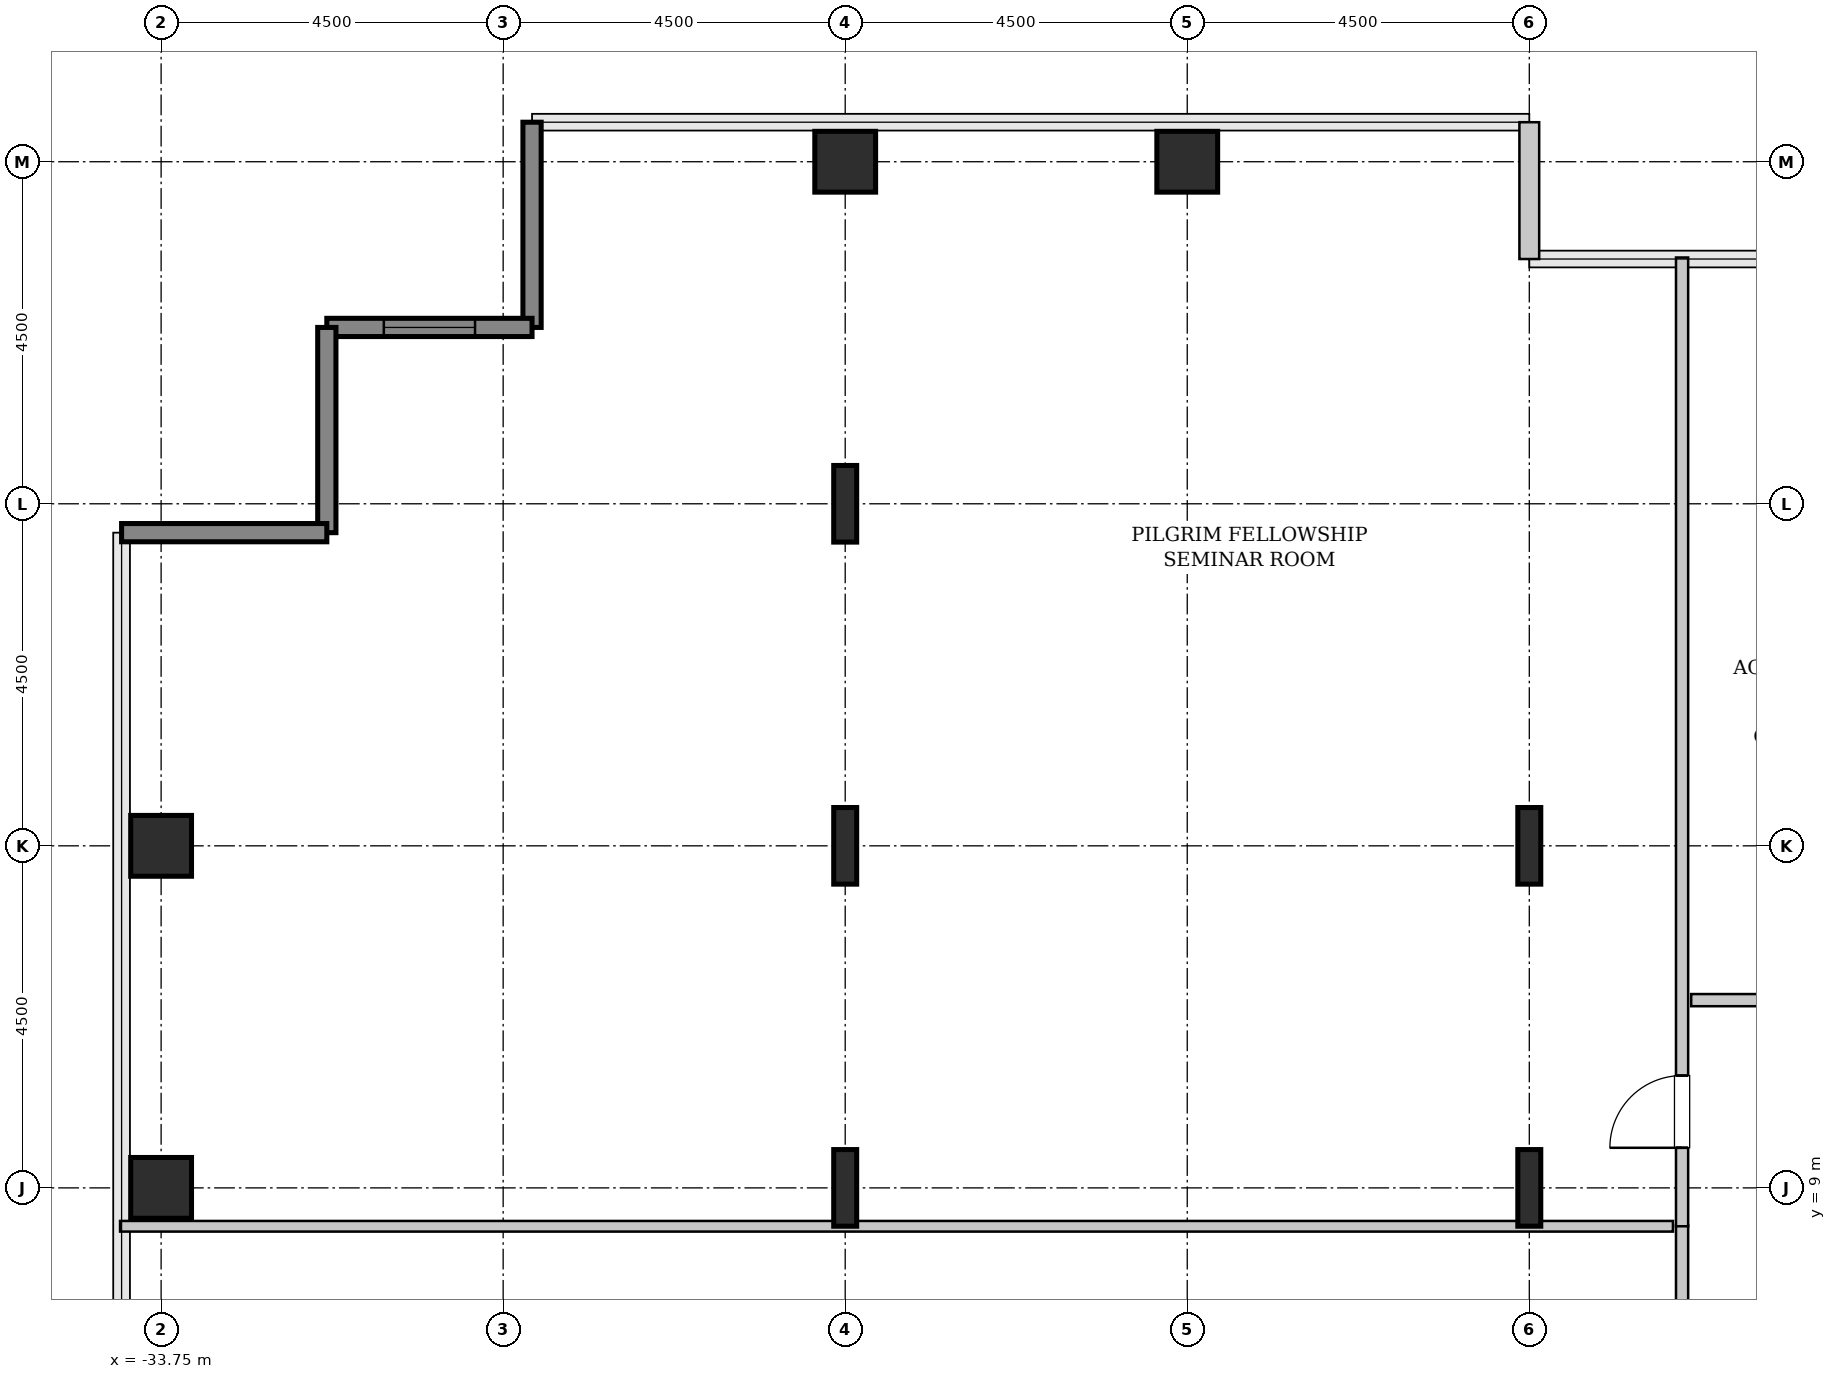
"""IFC4 building model, lengths in metres.
Left out: names, types, materials, properties, quantities, classifications, styles, units other than length and angle.
Written with IfcOpenShell. Run it as: python <this file> out.ifc"""

import sys

from ifc_helpers import new_model, si_unit, direction, frame, frame_2d, origin, origin_2d, place, context, subcontext, project, spatial, rectangle, hollow_rectangle, i_section, extrude, source, transform, mapped, element, fill, save


model = new_model("IFC4")
c1 = context("Model", 3, precision=1e-05, world=origin(), true_north=direction((0.0, 1.0)))
c2 = subcontext(c1, "Body", "Model", "MODEL_VIEW")
j1 = project(units=[si_unit("LENGTHUNIT", "METRE"), si_unit("PLANEANGLEUNIT", "RADIAN")], contexts=[c1])
p1 = place(None, origin())
s1 = spatial("IfcSite", under=j1, at=p1, CompositionType="ELEMENT")
p2 = place(p1, origin())
s2 = spatial("IfcBuilding", under=s1, at=p2, CompositionType="ELEMENT")
p3 = place(p2, frame((0.0, 0.0, 117.4)))
s3 = spatial("IfcBuildingStorey", under=s2, at=p3, CompositionType="ELEMENT", Elevation=117.4)
m1 = source(origin(), c2, "Body", "SweptSolid", [
    extrude(hollow_rectangle(XDim=0.8, YDim=0.8, WallThickness=0.04, InnerFilletRadius=0.04, OuterFilletRadius=0.08, at=origin_2d()), origin(), (0.0, 0.0, 1.0), 3.8),
])
for number, where, z_axis, x_axis in (
    (1, (-33.75, 9.0, 0.0), (0.0, 0.0, 1.0), (1.0, 0.0, 0.0)),
    (2, (-33.75, 13.5, 0.0), (0.0, 0.0, 1.0), (1.0, 0.0, 0.0)),
):
    element("IfcColumn", number, at=place(p3, frame(where, z_axis=z_axis, x_axis=x_axis)), inside=s3, PredefinedType="COLUMN", context=c2, shape_type="MappedRepresentation", body=[
        mapped(m1, transform((0.0, 0.0, 0.0), x_axis=(1.0, 0.0, 0.0), y_axis=(0.0, 1.0, 0.0), z_axis=(0.0, 0.0, 1.0), scale=1.0)),
    ])
m2 = source(origin(), c2, "Body", "SweptSolid", [
    extrude(i_section(OverallWidth=0.302, OverallDepth=1.008, WebThickness=0.021, FlangeThickness=0.04, FilletRadius=0.03, at=origin_2d()), origin(), (0.0, 0.0, 1.0), 3.8),
])
for number, where, z_axis, x_axis in (
    (3, (-24.75, 9.0, 0.0), (0.0, 0.0, 1.0), (1.0, 0.0, 0.0)),
    (4, (-24.75, 13.5, 0.0), (0.0, 0.0, 1.0), (1.0, 0.0, 0.0)),
    (5, (-24.75, 18.0, 0.0), (0.0, 0.0, 1.0), (1.0, 0.0, 0.0)),
):
    element("IfcColumn", number, at=place(p3, frame(where, z_axis=z_axis, x_axis=x_axis)), inside=s3, PredefinedType="COLUMN", context=c2, shape_type="MappedRepresentation", body=[
        mapped(m2, transform((0.0, 0.0, 0.0), x_axis=(1.0, 0.0, 0.0), y_axis=(0.0, 1.0, 0.0), z_axis=(0.0, 0.0, 1.0), scale=1.0)),
    ])
for number, where, z_axis, x_axis in (
    (6, (-24.75, 22.5, 0.0), (0.0, 0.0, 1.0), (1.0, 0.0, 0.0)),
    (7, (-20.25, 22.5, 0.0), (0.0, 0.0, 1.0), (1.0, 0.0, 0.0)),
):
    element("IfcColumn", number, at=place(p3, frame(where, z_axis=z_axis, x_axis=x_axis)), inside=s3, PredefinedType="COLUMN", context=c2, shape_type="MappedRepresentation", body=[
        mapped(m1, transform((0.0, 0.0, 0.0), x_axis=(1.0, 0.0, 0.0), y_axis=(0.0, 1.0, 0.0), z_axis=(0.0, 0.0, 1.0), scale=1.0)),
    ])
for number, where, z_axis, x_axis in (
    (8, (-15.75, 9.0, 0.0), (0.0, 0.0, 1.0), (1.0, 0.0, 0.0)),
    (9, (-15.75, 13.5, 0.0), (0.0, 0.0, 1.0), (1.0, 0.0, 0.0)),
):
    element("IfcColumn", number, at=place(p3, frame(where, z_axis=z_axis, x_axis=x_axis)), inside=s3, PredefinedType="COLUMN", context=c2, shape_type="MappedRepresentation", body=[
        mapped(m2, transform((0.0, 0.0, 0.0), x_axis=(1.0, 0.0, 0.0), y_axis=(0.0, 1.0, 0.0), z_axis=(0.0, 0.0, 1.0), scale=1.0)),
    ])
m3 = source(origin(), c2, "Body", "SweptSolid", [
    extrude(rectangle(XDim=1.8, YDim=0.26, at=frame_2d((0.9, 0.0))), origin(), (0.0, 0.0, 1.0), 3.55),
])
p4 = place(p3, frame((-15.75, 21.22, 0.0), z_axis=(0.0, 0.0, 1.0), x_axis=(0.0, 1.0, 0.0)))
e10 = element("IfcWall", 10, at=p4, inside=s3, PredefinedType="SOLIDWALL", context=c2, shape_type="MappedRepresentation", body=[
    mapped(m3, transform((0.0, 0.0, 0.0), x_axis=(1.0, 0.0, 0.0), y_axis=(0.0, 1.0, 0.0), z_axis=(0.0, 0.0, 1.0), scale=1.0)),
])
m4 = source(origin(), c2, "Body", "SweptSolid", [
    extrude(rectangle(XDim=2.7, YDim=0.24, at=frame_2d((1.35, 0.0))), origin(), (0.0, 0.0, 1.0), 3.55),
])
p5 = place(p3, frame((-28.87, 23.02, 0.0), z_axis=(0.0, 0.0, 1.0), x_axis=(0.0, -1.0, 0.0)))
e11 = element("IfcWall", 11, at=p5, inside=s3, PredefinedType="SHEAR", context=c2, shape_type="MappedRepresentation", body=[
    mapped(m4, transform((0.0, 0.0, 0.0), x_axis=(1.0, 0.0, 0.0), y_axis=(0.0, 1.0, 0.0), z_axis=(0.0, 0.0, 1.0), scale=1.0)),
])
p6 = place(p3, frame((-28.87, 20.32, 0.0), z_axis=(0.0, 0.0, 1.0), x_axis=(-1.0, 0.0, 0.0)))
e12 = element("IfcWall", 12, at=p6, inside=s3, PredefinedType="SHEAR", context=c2, shape_type="MappedRepresentation", body=[
    mapped(m4, transform((0.0, 0.0, 0.0), x_axis=(1.0, 0.0, 0.0), y_axis=(0.0, 1.0, 0.0), z_axis=(0.0, 0.0, 1.0), scale=1.0)),
])
p7 = place(p6, frame((0.75, 0.0, 0.85)))
e13 = element("IfcOpeningElement", 13, at=p7, cuts=e12, PredefinedType="OPENING", context=c2, shape_type="SweptSolid", body=[
    extrude(rectangle(XDim=1.2, YDim=1.8, at=frame_2d((0.6, 0.9))), frame((0.0, 0.13, 0.0), z_axis=(0.0, -1.0, 0.0), x_axis=(1.0, 0.0, 0.0)), (0.0, 0.0, 1.0), 0.26),
])
for number, where, z_axis, x_axis in (
    (14, (-31.57, 20.32, 0.0), (0.0, 0.0, 1.0), (0.0, -1.0, 0.0)),
    (15, (-31.57, 17.62, 0.0), (0.0, 0.0, 1.0), (-1.0, 0.0, 0.0)),
):
    element("IfcWall", number, at=place(p3, frame(where, z_axis=z_axis, x_axis=x_axis)), inside=s3, PredefinedType="SHEAR", context=c2, shape_type="MappedRepresentation", body=[
        mapped(m4, transform((0.0, 0.0, 0.0), x_axis=(1.0, 0.0, 0.0), y_axis=(0.0, 1.0, 0.0), z_axis=(0.0, 0.0, 1.0), scale=1.0)),
    ])
m5 = source(origin(), c2, "Body", "SweptSolid", [
    extrude(rectangle(XDim=3.41, YDim=0.16, at=frame_2d((1.705, 0.0))), origin(), (0.0, 0.0, 1.0), 3.535),
])
p8 = place(p3, frame((-13.74, 5.095, 0.0), z_axis=(0.0, 0.0, 1.0), x_axis=(0.0, 1.0, 0.0)))
e16 = element("IfcWall", 16, at=p8, inside=s3, PredefinedType="PARTITIONING", context=c2, shape_type="MappedRepresentation", body=[
    mapped(m5, transform((0.0, 0.0, 0.0), x_axis=(1.0, 0.0, 0.0), y_axis=(0.0, 1.0, 0.0), z_axis=(0.0, 0.0, 1.0), scale=1.0)),
])
p9 = place(p8, frame((1.23, 0.0, 0.0)))
e17 = element("IfcOpeningElement", 17, at=p9, cuts=e16, PredefinedType="OPENING", context=c2, shape_type="SweptSolid", body=[
    extrude(rectangle(XDim=0.95, YDim=2.1, at=frame_2d((0.475, 1.05))), frame((0.0, 0.09, 0.0), z_axis=(0.0, -1.0, 0.0), x_axis=(1.0, 0.0, 0.0)), (0.0, 0.0, 1.0), 0.18),
])
m6 = source(origin(), c2, "Body", "SweptSolid", [
    extrude(rectangle(XDim=20.43, YDim=0.14, at=frame_2d((10.215, 0.0))), origin(), (0.0, 0.0, 1.0), 2.875),
])
p10 = place(p3, frame((-34.29, 8.495, 0.0), z_axis=(0.0, 0.0, 1.0), x_axis=(1.0, 0.0, 0.0)))
e18 = element("IfcWall", 18, at=p10, inside=s3, PredefinedType="PARTITIONING", context=c2, shape_type="MappedRepresentation", body=[
    mapped(m6, transform((0.0, 0.0, 0.0), x_axis=(1.0, 0.0, 0.0), y_axis=(0.0, 1.0, 0.0), z_axis=(0.0, 0.0, 1.0), scale=1.0)),
])
m7 = source(origin(), c2, "Body", "SweptSolid", [
    extrude(rectangle(XDim=12.745, YDim=0.16, at=frame_2d((6.373, 0.0))), origin(), (0.0, 0.0, 1.0), 3.535),
])
p11 = place(p3, frame((-13.74, 8.495, 0.0), z_axis=(0.0, 0.0, 1.0), x_axis=(0.0, 1.0, 0.0)))
e19 = element("IfcWall", 19, at=p11, inside=s3, PredefinedType="PARTITIONING", context=c2, shape_type="MappedRepresentation", body=[
    mapped(m7, transform((0.0, 0.0, 0.0), x_axis=(1.0, 0.0, 0.0), y_axis=(0.0, 1.0, 0.0), z_axis=(0.0, 0.0, 1.0), scale=1.0)),
])
p12 = place(p11, frame((1.032, 0.0, 0.0)))
e20 = element("IfcOpeningElement", 20, at=p12, cuts=e19, PredefinedType="OPENING", context=c2, shape_type="SweptSolid", body=[
    extrude(rectangle(XDim=0.95, YDim=2.1, at=frame_2d((0.475, 1.05))), frame((0.0, 0.09, 0.0), z_axis=(0.0, -1.0, 0.0), x_axis=(1.0, 0.0, 0.0)), (0.0, 0.0, 1.0), 0.18),
])
m8 = source(origin(), c2, "Body", "SweptSolid", [
    extrude(rectangle(XDim=4.125, YDim=0.16, at=frame_2d((2.062, 0.0))), origin(), (0.0, 0.0, 1.0), 3.535),
])
p13 = place(p3, frame((-13.62, 11.47, 0.0), z_axis=(0.0, 0.0, 1.0), x_axis=(1.0, 0.0, 0.0)))
e21 = element("IfcWall", 21, at=p13, inside=s3, PredefinedType="PARTITIONING", context=c2, shape_type="MappedRepresentation", body=[
    mapped(m8, transform((0.0, 0.0, 0.0), x_axis=(1.0, 0.0, 0.0), y_axis=(0.0, 1.0, 0.0), z_axis=(0.0, 0.0, 1.0), scale=1.0)),
])
p14 = place(p13, frame((1.587, 0.0, 0.0)))
e22 = element("IfcOpeningElement", 22, at=p14, cuts=e21, PredefinedType="OPENING", context=c2, shape_type="SweptSolid", body=[
    extrude(rectangle(XDim=0.95, YDim=2.1, at=frame_2d((0.475, 1.05))), frame((0.0, 0.09, 0.0), z_axis=(0.0, -1.0, 0.0), x_axis=(1.0, 0.0, 0.0)), (0.0, 0.0, 1.0), 0.18),
])
m9 = source(origin(), c2, "Body", "SweptSolid", [
    extrude(rectangle(XDim=1.2, YDim=1.8, at=frame_2d((0.6, 0.9))), frame((0.0, 0.03, 0.0), z_axis=(0.0, -1.0, 0.0), x_axis=(1.0, 0.0, 0.0)), (0.0, 0.0, 1.0), 0.06),
])
p15 = place(p7, origin())
e23 = element("IfcWindow", 23, at=p15, inside=s3, PartitioningType="SINGLE_PANEL", PredefinedType="WINDOW", context=c2, shape_type="MappedRepresentation", body=[
    mapped(m9, transform((0.0, 0.0, 0.0), x_axis=(1.0, 0.0, 0.0), y_axis=(0.0, 1.0, 0.0), z_axis=(0.0, 0.0, 1.0), scale=1.0)),
])
fill(e13, e23)
m10 = source(origin(), c2, "Body", "SweptSolid", [
    extrude(rectangle(XDim=0.95, YDim=2.1, at=frame_2d((0.475, 1.05))), frame((0.0, 0.025, 0.0), z_axis=(0.0, -1.0, 0.0), x_axis=(1.0, 0.0, 0.0)), (0.0, 0.0, 1.0), 0.05),
])
p16 = place(p12, origin())
e24 = element("IfcDoor", 24, at=p16, inside=s3, OperationType="SINGLE_SWING_LEFT", PredefinedType="DOOR", context=c2, shape_type="MappedRepresentation", body=[
    mapped(m10, transform((0.0, 0.0, 0.0), x_axis=(1.0, 0.0, 0.0), y_axis=(0.0, 1.0, 0.0), z_axis=(0.0, 0.0, 1.0), scale=1.0)),
])
fill(e20, e24)
save(model, sys.argv[1])
